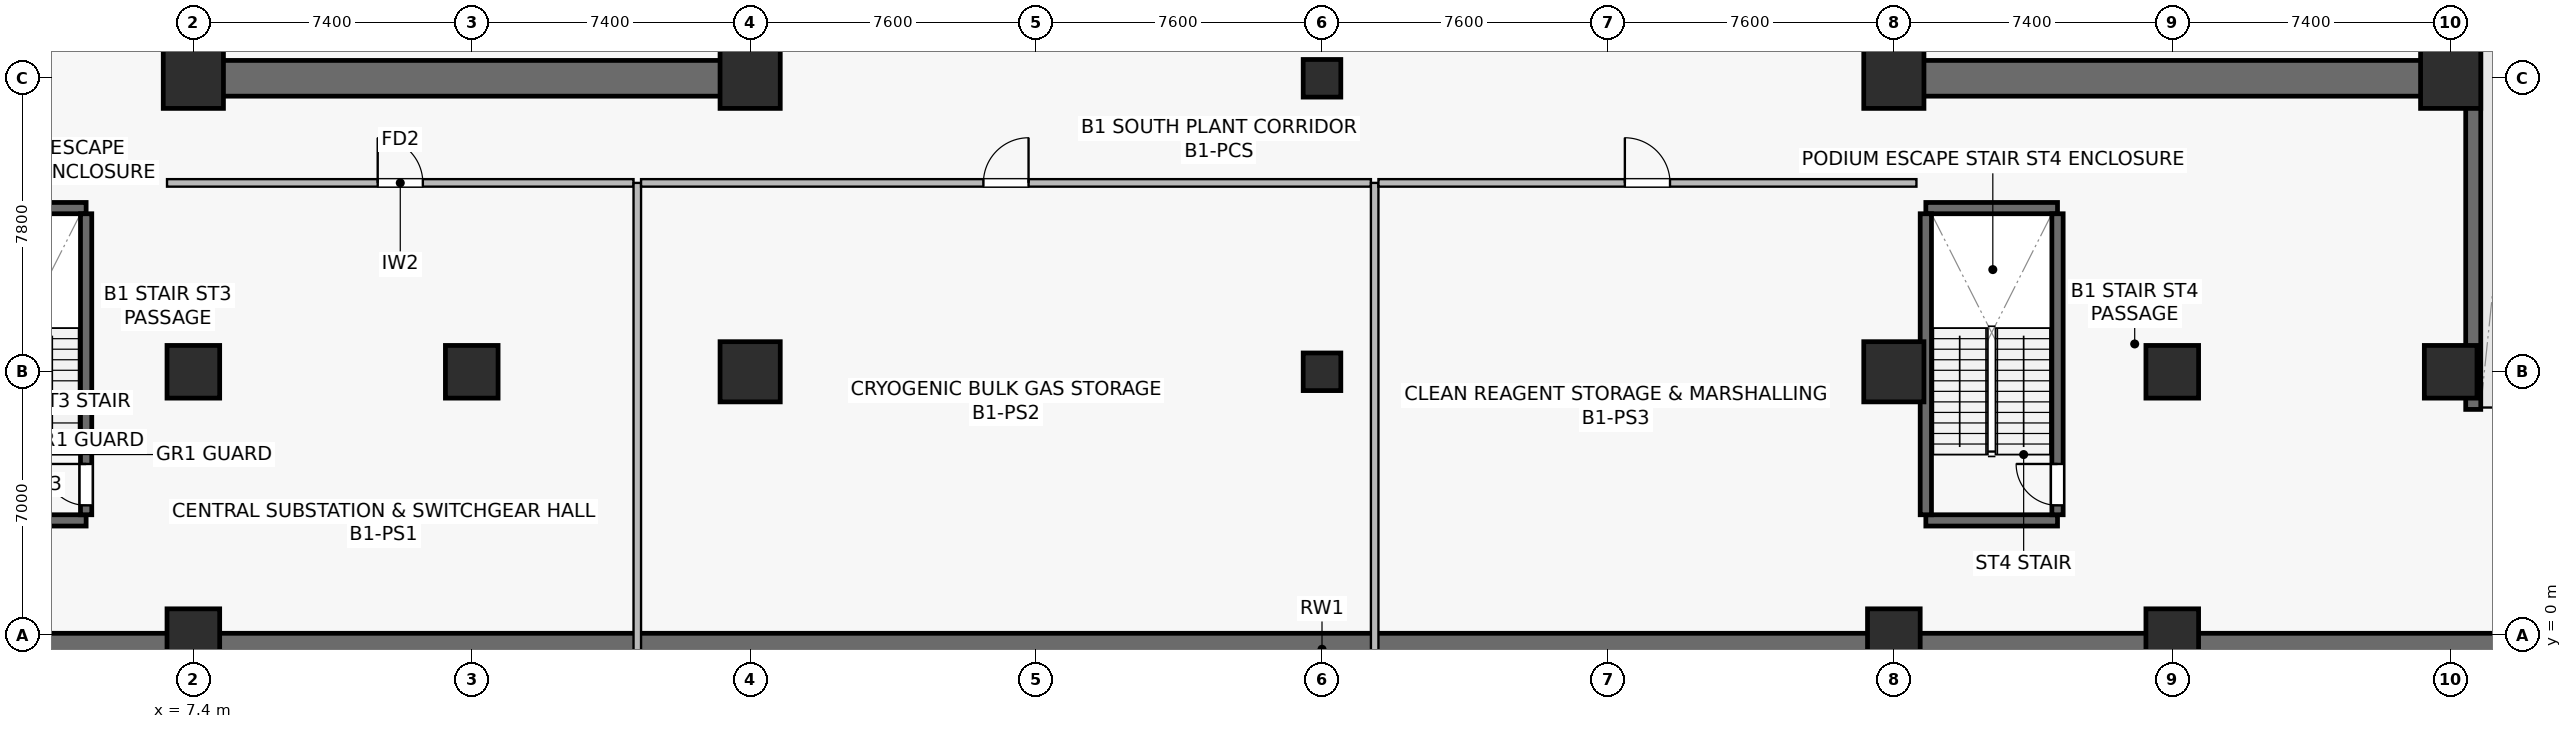
"""IFC4 building model, lengths in metres.
Left out: names, types, materials, properties, quantities, classifications, styles, units other than length and angle.
Written with IfcOpenShell. Run it as: python <this file> out.ifc"""

import sys

from ifc_helpers import new_model, si_unit, direction, frame, frame_2d, origin, origin_2d, place, context, subcontext, project, spatial, rectangle, extrude, source, transform, mapped, element, fill, save


model = new_model("IFC4")
c1 = context("Model", 3, precision=1e-05, world=origin(), true_north=direction((0.0, 1.0)))
c2 = subcontext(c1, "Body", "Model", "MODEL_VIEW")
j1 = project(units=[si_unit("LENGTHUNIT", "METRE"), si_unit("PLANEANGLEUNIT", "RADIAN")], contexts=[c1])
p1 = place(None, origin())
s1 = spatial("IfcSite", under=j1, at=p1, CompositionType="ELEMENT")
p2 = place(p1, origin())
s2 = spatial("IfcBuilding", under=s1, at=p2, CompositionType="ELEMENT")
p3 = place(p2, frame((0.0, 0.0, -4.8)))
s3 = spatial("IfcBuildingStorey", under=s2, at=p3, CompositionType="ELEMENT", Elevation=-4.8)
p4 = place(p3, frame((6.925, 14.8, 0.0), z_axis=(0.0, 0.0, 1.0), x_axis=(1.0, 0.0, 0.0)))
e1 = element("IfcWall", 1, at=p4, inside=s3, PredefinedType="SHEAR", context=c2, shape_type="SweptSolid", body=[
    extrude(rectangle(XDim=15.75, YDim=0.95, at=frame_2d((7.875, 0.0))), origin(), (0.0, 0.0, 1.0), 4.45),
])
p5 = place(p3, frame((7.4, 15.275, 0.0), z_axis=(0.0, 0.0, 1.0), x_axis=(0.0, 1.0, 0.0)))
e2 = element("IfcWall", 2, at=p5, inside=s3, PredefinedType="SHEAR", context=c2, shape_type="SweptSolid", body=[
    extrude(rectangle(XDim=18.05, YDim=0.95, at=frame_2d((9.025, 0.0))), origin(), (0.0, 0.0, 1.0), 4.45),
])
p6 = place(p3, frame((22.2, 15.275, 0.0), z_axis=(0.0, 0.0, 1.0), x_axis=(0.0, 1.0, 0.0)))
e3 = element("IfcWall", 3, at=p6, inside=s3, PredefinedType="SHEAR", context=c2, shape_type="SweptSolid", body=[
    extrude(rectangle(XDim=18.05, YDim=0.95, at=frame_2d((9.025, 0.0))), origin(), (0.0, 0.0, 1.0), 4.45),
])
p7 = place(p6, frame((3.275, 0.0, 0.0)))
e4 = element("IfcOpeningElement", 4, at=p7, cuts=e3, PredefinedType="OPENING", context=c2, shape_type="SweptSolid", body=[
    extrude(rectangle(XDim=1.42, YDim=2.2, at=frame_2d((0.71, 1.1))), frame((0.0, 0.485, 0.0), z_axis=(0.0, -1.0, 0.0), x_axis=(1.0, 0.0, 0.0)), (0.0, 0.0, 1.0), 0.97),
])
p8 = place(p3, frame((52.125, 14.8, 0.0), z_axis=(0.0, 0.0, 1.0), x_axis=(1.0, 0.0, 0.0)))
e5 = element("IfcWall", 5, at=p8, inside=s3, PredefinedType="SHEAR", context=c2, shape_type="SweptSolid", body=[
    extrude(rectangle(XDim=15.75, YDim=0.95, at=frame_2d((7.875, 0.0))), origin(), (0.0, 0.0, 1.0), 4.45),
])
p9 = place(p3, frame((52.6, 15.275, 0.0), z_axis=(0.0, 0.0, 1.0), x_axis=(0.0, 1.0, 0.0)))
e6 = element("IfcWall", 6, at=p9, inside=s3, PredefinedType="SHEAR", context=c2, shape_type="SweptSolid", body=[
    extrude(rectangle(XDim=18.05, YDim=0.95, at=frame_2d((9.025, 0.0))), origin(), (0.0, 0.0, 1.0), 4.45),
])
p10 = place(p9, frame((3.275, 0.0, 0.0)))
e7 = element("IfcOpeningElement", 7, at=p10, cuts=e6, PredefinedType="OPENING", context=c2, shape_type="SweptSolid", body=[
    extrude(rectangle(XDim=1.42, YDim=2.2, at=frame_2d((0.71, 1.1))), frame((0.0, 0.485, 0.0), z_axis=(0.0, -1.0, 0.0), x_axis=(1.0, 0.0, 0.0)), (0.0, 0.0, 1.0), 0.97),
])
p11 = place(p3, frame((67.4, 15.275, 0.0), z_axis=(0.0, 0.0, 1.0), x_axis=(0.0, 1.0, 0.0)))
e8 = element("IfcWall", 8, at=p11, inside=s3, PredefinedType="SHEAR", context=c2, shape_type="SweptSolid", body=[
    extrude(rectangle(XDim=18.05, YDim=0.95, at=frame_2d((9.025, 0.0))), origin(), (0.0, 0.0, 1.0), 4.45),
])
for number, where, z_axis, x_axis in (
    (9, (1.05, 3.05, 0.0), (0.0, 0.0, 1.0), (1.0, 0.0, 0.0)),
    (10, (1.05, 11.35, 0.0), (0.0, 0.0, 1.0), (1.0, 0.0, 0.0)),
):
    element("IfcWall", number, at=place(p3, frame(where, z_axis=z_axis, x_axis=x_axis)), inside=s3, PredefinedType="SHEAR", context=c2, shape_type="SweptSolid", body=[
        extrude(rectangle(XDim=3.5, YDim=0.3, at=frame_2d((1.75, 0.0))), origin(), (0.0, 0.0, 1.0), 4.45),
    ])
p12 = place(p3, frame((4.55, 3.2, 0.0), z_axis=(0.0, 0.0, 1.0), x_axis=(0.0, 1.0, 0.0)))
e11 = element("IfcWall", 11, at=p12, inside=s3, PredefinedType="SHEAR", context=c2, shape_type="SweptSolid", body=[
    extrude(rectangle(XDim=8.0, YDim=0.3, at=frame_2d((4.0, 0.0))), origin(), (0.0, 0.0, 1.0), 4.45),
])
p13 = place(p12, frame((0.25, 0.0, 0.0)))
e12 = element("IfcOpeningElement", 12, at=p13, cuts=e11, PredefinedType="OPENING", context=c2, shape_type="SweptSolid", body=[
    extrude(rectangle(XDim=1.1, YDim=2.15, at=frame_2d((0.55, 1.075))), frame((0.0, 0.16, 0.0), z_axis=(0.0, -1.0, 0.0), x_axis=(1.0, 0.0, 0.0)), (0.0, 0.0, 1.0), 0.32),
])
for number, where, z_axis, x_axis in (
    (13, (53.45, 3.05, 0.0), (0.0, 0.0, 1.0), (1.0, 0.0, 0.0)),
    (14, (53.45, 11.35, 0.0), (0.0, 0.0, 1.0), (1.0, 0.0, 0.0)),
):
    element("IfcWall", number, at=place(p3, frame(where, z_axis=z_axis, x_axis=x_axis)), inside=s3, PredefinedType="SHEAR", context=c2, shape_type="SweptSolid", body=[
        extrude(rectangle(XDim=3.5, YDim=0.3, at=frame_2d((1.75, 0.0))), origin(), (0.0, 0.0, 1.0), 4.45),
    ])
p14 = place(p3, frame((53.45, 3.2, 0.0), z_axis=(0.0, 0.0, 1.0), x_axis=(0.0, 1.0, 0.0)))
e15 = element("IfcWall", 15, at=p14, inside=s3, PredefinedType="SHEAR", context=c2, shape_type="SweptSolid", body=[
    extrude(rectangle(XDim=8.0, YDim=0.3, at=frame_2d((4.0, 0.0))), origin(), (0.0, 0.0, 1.0), 4.45),
])
p15 = place(p3, frame((56.95, 3.2, 0.0), z_axis=(0.0, 0.0, 1.0), x_axis=(0.0, 1.0, 0.0)))
e16 = element("IfcWall", 16, at=p15, inside=s3, PredefinedType="SHEAR", context=c2, shape_type="SweptSolid", body=[
    extrude(rectangle(XDim=8.0, YDim=0.3, at=frame_2d((4.0, 0.0))), origin(), (0.0, 0.0, 1.0), 4.45),
])
p16 = place(p15, frame((0.25, 0.0, 0.0)))
e17 = element("IfcOpeningElement", 17, at=p16, cuts=e16, PredefinedType="OPENING", context=c2, shape_type="SweptSolid", body=[
    extrude(rectangle(XDim=1.1, YDim=2.15, at=frame_2d((0.55, 1.075))), frame((0.0, 0.16, 0.0), z_axis=(0.0, -1.0, 0.0), x_axis=(1.0, 0.0, 0.0)), (0.0, 0.0, 1.0), 0.32),
])
p17 = place(p3, frame((-1.0, -0.375, 0.0), z_axis=(0.0, 0.0, 1.0), x_axis=(1.0, 0.0, 0.0)))
e18 = element("IfcWall", 18, at=p17, inside=s3, PredefinedType="SOLIDWALL", context=c2, shape_type="SweptSolid", body=[
    extrude(rectangle(XDim=76.8, YDim=0.85, at=frame_2d((38.4, 0.0))), origin(), (0.0, 0.0, 1.0), 4.45),
])
p18 = place(p3, frame((68.0, 6.0, 0.0), z_axis=(0.0, 0.0, 1.0), x_axis=(0.0, 1.0, 0.0)))
e19 = element("IfcWall", 19, at=p18, inside=s3, PredefinedType="SHEAR", context=c2, shape_type="SweptSolid", body=[
    extrude(rectangle(XDim=40.4, YDim=0.4, at=frame_2d((20.2, 0.0))), origin(), (0.0, 0.0, 1.0), 4.45),
])
m1 = source(origin(), c2, "Body", "SweptSolid", [
    extrude(rectangle(XDim=1.4, YDim=1.4, at=origin_2d()), origin(), (0.0, 0.0, 1.0), 4.8),
])
p19 = place(p3, frame((14.8, 7.0, 0.0), z_axis=(0.0, 0.0, 1.0), x_axis=(1.0, 0.0, 0.0)))
e20 = element("IfcColumn", 20, at=p19, inside=s3, PredefinedType="COLUMN", context=c2, shape_type="MappedRepresentation", body=[
    mapped(m1, transform((0.0, 0.0, 0.0), scale=1.0)),
])
m2 = source(origin(), c2, "Body", "SweptSolid", [
    extrude(rectangle(XDim=1.6, YDim=1.6, at=origin_2d()), origin(), (0.0, 0.0, 1.0), 4.8),
])
for number, where, z_axis, x_axis in (
    (21, (22.2, 7.0, 0.0), (0.0, 0.0, 1.0), (1.0, 0.0, 0.0)),
    (22, (7.4, 14.8, 0.0), (0.0, 0.0, 1.0), (1.0, 0.0, 0.0)),
    (23, (22.2, 14.8, 0.0), (0.0, 0.0, 1.0), (1.0, 0.0, 0.0)),
    (24, (52.6, 7.0, 0.0), (0.0, 0.0, 1.0), (1.0, 0.0, 0.0)),
):
    element("IfcColumn", number, at=place(p3, frame(where, z_axis=z_axis, x_axis=x_axis)), inside=s3, PredefinedType="COLUMN", context=c2, shape_type="MappedRepresentation", body=[
        mapped(m2, transform((0.0, 0.0, 0.0), scale=1.0)),
    ])
p20 = place(p3, frame((60.0, 7.0, 0.0), z_axis=(0.0, 0.0, 1.0), x_axis=(1.0, 0.0, 0.0)))
e25 = element("IfcColumn", 25, at=p20, inside=s3, PredefinedType="COLUMN", context=c2, shape_type="MappedRepresentation", body=[
    mapped(m1, transform((0.0, 0.0, 0.0), scale=1.0)),
])
for number, where, z_axis, x_axis in (
    (26, (52.6, 14.8, 0.0), (0.0, 0.0, 1.0), (1.0, 0.0, 0.0)),
    (27, (67.4, 14.8, 0.0), (0.0, 0.0, 1.0), (1.0, 0.0, 0.0)),
):
    element("IfcColumn", number, at=place(p3, frame(where, z_axis=z_axis, x_axis=x_axis)), inside=s3, PredefinedType="COLUMN", context=c2, shape_type="MappedRepresentation", body=[
        mapped(m2, transform((0.0, 0.0, 0.0), scale=1.0)),
    ])
for number, where, z_axis, x_axis in (
    (28, (7.4, 7.0, 0.0), (0.0, 0.0, 1.0), (1.0, 0.0, 0.0)),
    (29, (67.4, 7.0, 0.0), (0.0, 0.0, 1.0), (1.0, 0.0, 0.0)),
):
    element("IfcColumn", number, at=place(p3, frame(where, z_axis=z_axis, x_axis=x_axis)), inside=s3, PredefinedType="COLUMN", context=c2, shape_type="MappedRepresentation", body=[
        mapped(m1, transform((0.0, 0.0, 0.0), scale=1.0)),
    ])
m3 = source(origin(), c2, "Body", "SweptSolid", [
    extrude(rectangle(XDim=1.0, YDim=1.0, at=origin_2d()), origin(), (0.0, 0.0, 1.0), 4.8),
])
for number, where, z_axis, x_axis in (
    (30, (37.4, 7.0, 0.0), (0.0, 0.0, 1.0), (1.0, 0.0, 0.0)),
    (31, (37.4, 14.8, 0.0), (0.0, 0.0, 1.0), (1.0, 0.0, 0.0)),
):
    element("IfcColumn", number, at=place(p3, frame(where, z_axis=z_axis, x_axis=x_axis)), inside=s3, PredefinedType="COLUMN", context=c2, shape_type="MappedRepresentation", body=[
        mapped(m3, transform((0.0, 0.0, 0.0), scale=1.0)),
    ])
for number, where, z_axis, x_axis in (
    (32, (7.4, 0.0, 0.0), (0.0, 0.0, 1.0), (1.0, 0.0, 0.0)),
    (33, (52.6, 0.0, 0.0), (0.0, 0.0, 1.0), (1.0, 0.0, 0.0)),
    (34, (60.0, 0.0, 0.0), (0.0, 0.0, 1.0), (1.0, 0.0, 0.0)),
):
    element("IfcColumn", number, at=place(p3, frame(where, z_axis=z_axis, x_axis=x_axis)), inside=s3, PredefinedType="COLUMN", context=c2, shape_type="MappedRepresentation", body=[
        mapped(m1, transform((0.0, 0.0, 0.0), scale=1.0)),
    ])
p21 = place(p3, frame((6.7, 12.02, 0.0), z_axis=(0.0, 0.0, 1.0), x_axis=(1.0, 0.0, 0.0)))
e35 = element("IfcWall", 35, at=p21, inside=s3, PredefinedType="SOLIDWALL", context=c2, shape_type="SweptSolid", body=[
    extrude(rectangle(XDim=12.4, YDim=0.2, at=frame_2d((6.2, 0.0))), origin(), (0.0, 0.0, 1.0), 3.685),
])
p22 = place(p21, frame((5.6, 0.0, 0.0)))
e36 = element("IfcOpeningElement", 36, at=p22, cuts=e35, PredefinedType="OPENING", context=c2, shape_type="SweptSolid", body=[
    extrude(rectangle(XDim=1.2, YDim=2.16, at=frame_2d((0.6, 1.08))), frame((0.0, 0.11, 0.0), z_axis=(0.0, -1.0, 0.0), x_axis=(1.0, 0.0, 0.0)), (0.0, 0.0, 1.0), 0.22),
])
p23 = place(p3, frame((19.2, -0.69, 0.0), z_axis=(0.0, 0.0, 1.0), x_axis=(0.0, 1.0, 0.0)))
e37 = element("IfcWall", 37, at=p23, inside=s3, PredefinedType="SOLIDWALL", context=c2, shape_type="SweptSolid", body=[
    extrude(rectangle(XDim=12.71, YDim=0.2, at=frame_2d((6.355, 0.0))), origin(), (0.0, 0.0, 1.0), 3.635),
])
p24 = place(p3, frame((19.3, 12.02, 0.0), z_axis=(0.0, 0.0, 1.0), x_axis=(1.0, 0.0, 0.0)))
e38 = element("IfcWall", 38, at=p24, inside=s3, PredefinedType="SOLIDWALL", context=c2, shape_type="SweptSolid", body=[
    extrude(rectangle(XDim=19.4, YDim=0.2, at=frame_2d((9.7, 0.0))), origin(), (0.0, 0.0, 1.0), 3.685),
])
p25 = place(p24, frame((9.1, 0.0, 0.0)))
e39 = element("IfcOpeningElement", 39, at=p25, cuts=e38, PredefinedType="OPENING", context=c2, shape_type="SweptSolid", body=[
    extrude(rectangle(XDim=1.2, YDim=2.16, at=frame_2d((0.6, 1.08))), frame((0.0, 0.11, 0.0), z_axis=(0.0, -1.0, 0.0), x_axis=(1.0, 0.0, 0.0)), (0.0, 0.0, 1.0), 0.22),
])
p26 = place(p3, frame((38.8, -0.69, 0.0), z_axis=(0.0, 0.0, 1.0), x_axis=(0.0, 1.0, 0.0)))
e40 = element("IfcWall", 40, at=p26, inside=s3, PredefinedType="SOLIDWALL", context=c2, shape_type="SweptSolid", body=[
    extrude(rectangle(XDim=12.71, YDim=0.2, at=frame_2d((6.355, 0.0))), origin(), (0.0, 0.0, 1.0), 3.635),
])
p27 = place(p3, frame((38.9, 12.02, 0.0), z_axis=(0.0, 0.0, 1.0), x_axis=(1.0, 0.0, 0.0)))
e41 = element("IfcWall", 41, at=p27, inside=s3, PredefinedType="SOLIDWALL", context=c2, shape_type="SweptSolid", body=[
    extrude(rectangle(XDim=14.3, YDim=0.2, at=frame_2d((7.15, 0.0))), origin(), (0.0, 0.0, 1.0), 3.685),
])
p28 = place(p27, frame((6.55, 0.0, 0.0)))
e42 = element("IfcOpeningElement", 42, at=p28, cuts=e41, PredefinedType="OPENING", context=c2, shape_type="SweptSolid", body=[
    extrude(rectangle(XDim=1.2, YDim=2.16, at=frame_2d((0.6, 1.08))), frame((0.0, 0.11, 0.0), z_axis=(0.0, -1.0, 0.0), x_axis=(1.0, 0.0, 0.0)), (0.0, 0.0, 1.0), 0.22),
])
m4 = source(origin(), c2, "Body", "SweptSolid", [
    extrude(rectangle(XDim=1.1, YDim=2.15, at=frame_2d((0.55, 1.075))), frame((0.0, 0.025, 0.0), z_axis=(0.0, -1.0, 0.0), x_axis=(1.0, 0.0, 0.0)), (0.0, 0.0, 1.0), 0.05),
])
p29 = place(p13, origin())
e43 = element("IfcDoor", 43, at=p29, inside=s3, OperationType="SINGLE_SWING_RIGHT", PredefinedType="DOOR", context=c2, shape_type="MappedRepresentation", body=[
    mapped(m4, transform((0.0, 0.0, 0.0), scale=1.0)),
])
fill(e12, e43)
p30 = place(p16, origin())
e44 = element("IfcDoor", 44, at=p30, inside=s3, OperationType="SINGLE_SWING_RIGHT", PredefinedType="DOOR", context=c2, shape_type="MappedRepresentation", body=[
    mapped(m4, transform((0.0, 0.0, 0.0), scale=1.0)),
])
fill(e17, e44)
m5 = source(origin(), c2, "Body", "SweptSolid", [
    extrude(rectangle(XDim=1.2, YDim=2.16, at=frame_2d((0.6, 1.08))), frame((0.0, 0.025, 0.0), z_axis=(0.0, -1.0, 0.0), x_axis=(1.0, 0.0, 0.0)), (0.0, 0.0, 1.0), 0.05),
])
p31 = place(p22, origin())
e45 = element("IfcDoor", 45, at=p31, inside=s3, OperationType="SINGLE_SWING_LEFT", PredefinedType="DOOR", context=c2, shape_type="MappedRepresentation", body=[
    mapped(m5, transform((0.0, 0.0, 0.0), scale=1.0)),
])
fill(e36, e45)
p32 = place(p25, origin())
e46 = element("IfcDoor", 46, at=p32, inside=s3, OperationType="SINGLE_SWING_RIGHT", PredefinedType="DOOR", context=c2, shape_type="MappedRepresentation", body=[
    mapped(m5, transform((0.0, 0.0, 0.0), scale=1.0)),
])
fill(e39, e46)
p33 = place(p28, origin())
e47 = element("IfcDoor", 47, at=p33, inside=s3, OperationType="SINGLE_SWING_LEFT", PredefinedType="DOOR", context=c2, shape_type="MappedRepresentation", body=[
    mapped(m5, transform((0.0, 0.0, 0.0), scale=1.0)),
])
fill(e42, e47)
save(model, sys.argv[1])
